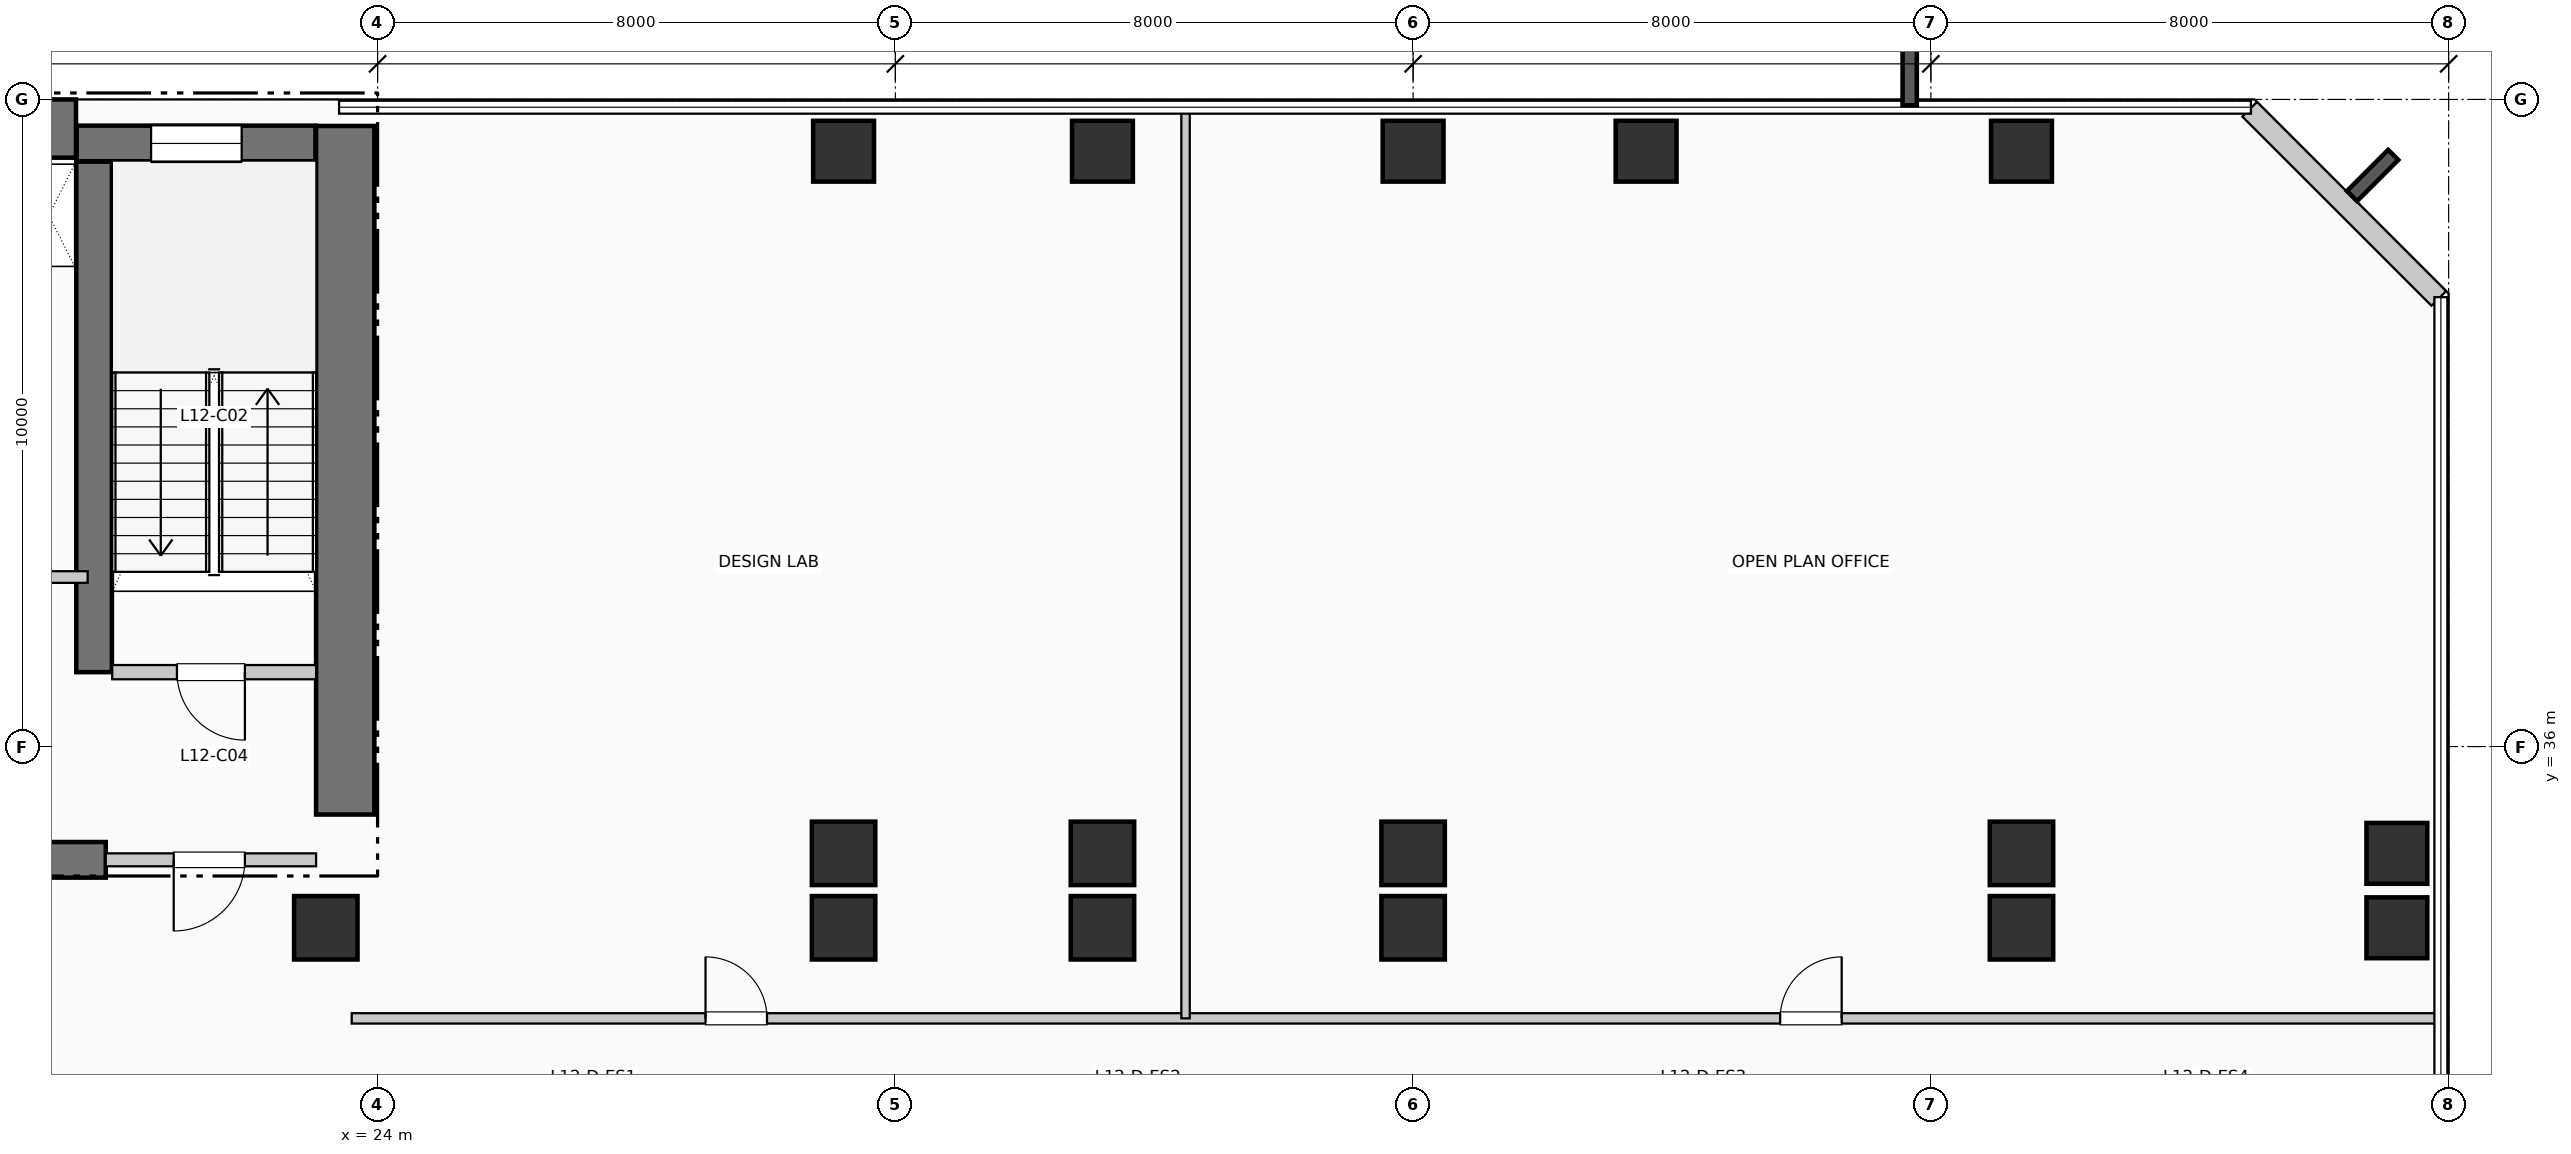
"""IFC4 building model, lengths in metres.
Left out: names, types, materials, properties, quantities, classifications, styles, units other than length and angle.
Written with IfcOpenShell. Run it as: python <this file> out.ifc"""

import sys

from ifc_helpers import new_model, si_unit, direction, frame, frame_2d, origin, origin_2d, place, context, subcontext, project, spatial, rectangle, extrude, element, fill, save


model = new_model("IFC4")
c1 = context("Model", 3, precision=1e-05, world=origin(), true_north=direction((0.0, 1.0)))
c2 = subcontext(c1, "Body", "Model", "MODEL_VIEW")
j1 = project(units=[si_unit("LENGTHUNIT", "METRE"), si_unit("PLANEANGLEUNIT", "RADIAN")], contexts=[c1])
p1 = place(None, origin())
s1 = spatial("IfcSite", under=j1, at=p1, CompositionType="ELEMENT")
p2 = place(p1, origin())
s2 = spatial("IfcBuilding", under=s1, at=p2, CompositionType="ELEMENT")
p3 = place(p2, frame((0.0, 0.0, 54.12)))
s3 = spatial("IfcBuildingStorey", under=s2, at=p3, CompositionType="ELEMENT", Elevation=54.12)
p4 = place(p3, frame((5.36, 45.55, 0.0), z_axis=(0.0, 0.0, 1.0), x_axis=(1.0, 0.0, 0.0)))
e1 = element("IfcWall", 1, at=p4, inside=s3, PredefinedType="SHEAR", context=c2, shape_type="SweptSolid", body=[
    extrude(rectangle(XDim=13.98, YDim=0.9, at=frame_2d((6.99, 0.0))), origin(), (0.0, 0.0, 1.0), 3.96),
])
p5 = place(p3, frame((23.5, 34.95, 0.0), z_axis=(0.0, 0.0, 1.0), x_axis=(0.0, 1.0, 0.0)))
e2 = element("IfcWall", 2, at=p5, inside=s3, PredefinedType="SHEAR", context=c2, shape_type="SweptSolid", body=[
    extrude(rectangle(XDim=10.64, YDim=0.9, at=frame_2d((5.32, 0.0))), origin(), (0.0, 0.0, 1.0), 3.96),
])
p6 = place(p3, frame((13.68, 34.25, 0.0), z_axis=(0.0, 0.0, 1.0), x_axis=(1.0, 0.0, 0.0)))
e3 = element("IfcWall", 3, at=p6, inside=s3, PredefinedType="SHEAR", context=c2, shape_type="SweptSolid", body=[
    extrude(rectangle(XDim=6.12, YDim=0.55, at=frame_2d((3.06, 0.0))), origin(), (0.0, 0.0, 1.0), 3.96),
])
p7 = place(p3, frame((19.62, 37.15, 0.0), z_axis=(0.0, 0.0, 1.0), x_axis=(0.0, 1.0, 0.0)))
e4 = element("IfcWall", 4, at=p7, inside=s3, PredefinedType="SHEAR", context=c2, shape_type="SweptSolid", body=[
    extrude(rectangle(XDim=7.89, YDim=0.55, at=frame_2d((3.945, 0.0))), origin(), (0.0, 0.0, 1.0), 3.96),
])
p8 = place(p3, frame((19.35, 45.32, 0.0), z_axis=(0.0, 0.0, 1.0), x_axis=(1.0, 0.0, 0.0)))
e5 = element("IfcWall", 5, at=p8, inside=s3, PredefinedType="SHEAR", context=c2, shape_type="SweptSolid", body=[
    extrude(rectangle(XDim=3.69, YDim=0.55, at=frame_2d((1.845, 0.0))), origin(), (0.0, 0.0, 1.0), 3.96),
])
p9 = place(p8, frame((1.15, 0.0, 1.05)))
e6 = element("IfcOpeningElement", 6, at=p9, cuts=e5, PredefinedType="OPENING", context=c2, shape_type="SweptSolid", body=[
    extrude(rectangle(XDim=1.4, YDim=1.8, at=frame_2d((0.7, 0.9))), frame((0.0, 0.285, 0.0), z_axis=(0.0, -1.0, 0.0), x_axis=(1.0, 0.0, 0.0)), (0.0, 0.0, 1.0), 0.57),
])
for number, where, z_axis, x_axis in (
    (7, (23.2, 33.2, 0.0), (0.0, 0.0, 1.0), (1.0, 0.0, 0.0)),
    (8, (31.2, 33.2, 0.0), (0.0, 0.0, 1.0), (1.0, 0.0, 0.0)),
    (9, (31.2, 34.35, 0.0), (0.0, 0.0, 1.0), (1.0, 0.0, 0.0)),
):
    element("IfcColumn", number, at=place(p3, frame(where, z_axis=z_axis, x_axis=x_axis)), inside=s3, PredefinedType="COLUMN", context=c2, shape_type="SweptSolid", body=[
        extrude(rectangle(XDim=0.98, YDim=0.98, at=origin_2d()), origin(), (0.0, 0.0, 1.0), 3.96),
    ])
p10 = place(p3, frame((31.2, 45.2, 0.0), z_axis=(0.0, 0.0, 1.0), x_axis=(1.0, 0.0, 0.0)))
e10 = element("IfcColumn", 10, at=p10, inside=s3, PredefinedType="COLUMN", context=c2, shape_type="SweptSolid", body=[
    extrude(rectangle(XDim=0.94, YDim=0.94, at=origin_2d()), origin(), (0.0, 0.0, 1.0), 3.96),
])
for number, where, z_axis, x_axis in (
    (11, (35.2, 33.2, 0.0), (0.0, 0.0, 1.0), (1.0, 0.0, 0.0)),
    (12, (35.2, 34.35, 0.0), (0.0, 0.0, 1.0), (1.0, 0.0, 0.0)),
):
    element("IfcColumn", number, at=place(p3, frame(where, z_axis=z_axis, x_axis=x_axis)), inside=s3, PredefinedType="COLUMN", context=c2, shape_type="SweptSolid", body=[
        extrude(rectangle(XDim=0.98, YDim=0.98, at=origin_2d()), origin(), (0.0, 0.0, 1.0), 3.96),
    ])
p11 = place(p3, frame((35.2, 45.2, 0.0), z_axis=(0.0, 0.0, 1.0), x_axis=(1.0, 0.0, 0.0)))
e13 = element("IfcColumn", 13, at=p11, inside=s3, PredefinedType="COLUMN", context=c2, shape_type="SweptSolid", body=[
    extrude(rectangle(XDim=0.94, YDim=0.94, at=origin_2d()), origin(), (0.0, 0.0, 1.0), 3.96),
])
for number, where, z_axis, x_axis in (
    (14, (40.0, 33.2, 0.0), (0.0, 0.0, 1.0), (1.0, 0.0, 0.0)),
    (15, (40.0, 34.35, 0.0), (0.0, 0.0, 1.0), (1.0, 0.0, 0.0)),
):
    element("IfcColumn", number, at=place(p3, frame(where, z_axis=z_axis, x_axis=x_axis)), inside=s3, PredefinedType="COLUMN", context=c2, shape_type="SweptSolid", body=[
        extrude(rectangle(XDim=0.98, YDim=0.98, at=origin_2d()), origin(), (0.0, 0.0, 1.0), 3.96),
    ])
for number, where, z_axis, x_axis in (
    (16, (40.0, 45.2, 0.0), (0.0, 0.0, 1.0), (1.0, 0.0, 0.0)),
    (17, (43.6, 45.2, 0.0), (0.0, 0.0, 1.0), (1.0, 0.0, 0.0)),
):
    element("IfcColumn", number, at=place(p3, frame(where, z_axis=z_axis, x_axis=x_axis)), inside=s3, PredefinedType="COLUMN", context=c2, shape_type="SweptSolid", body=[
        extrude(rectangle(XDim=0.94, YDim=0.94, at=origin_2d()), origin(), (0.0, 0.0, 1.0), 3.96),
    ])
for number, where, z_axis, x_axis in (
    (18, (49.4, 33.2, 0.0), (0.0, 0.0, 1.0), (1.0, 0.0, 0.0)),
    (19, (49.4, 34.35, 0.0), (0.0, 0.0, 1.0), (1.0, 0.0, 0.0)),
):
    element("IfcColumn", number, at=place(p3, frame(where, z_axis=z_axis, x_axis=x_axis)), inside=s3, PredefinedType="COLUMN", context=c2, shape_type="SweptSolid", body=[
        extrude(rectangle(XDim=0.98, YDim=0.98, at=origin_2d()), origin(), (0.0, 0.0, 1.0), 3.96),
    ])
for number, where, z_axis, x_axis in (
    (20, (49.4, 45.2, 0.0), (0.0, 0.0, 1.0), (1.0, 0.0, 0.0)),
    (21, (55.2, 33.2, 0.0), (0.0, 0.0, 1.0), (1.0, 0.0, 0.0)),
    (22, (55.2, 34.35, 0.0), (0.0, 0.0, 1.0), (1.0, 0.0, 0.0)),
):
    element("IfcColumn", number, at=place(p3, frame(where, z_axis=z_axis, x_axis=x_axis)), inside=s3, PredefinedType="COLUMN", context=c2, shape_type="SweptSolid", body=[
        extrude(rectangle(XDim=0.94, YDim=0.94, at=origin_2d()), origin(), (0.0, 0.0, 1.0), 3.96),
    ])
p12 = place(p3, frame((55.848, 42.926, 0.0), z_axis=(0.0, 0.0, 1.0), x_axis=(-0.707106781187, 0.707106781187, 0.0)))
e23 = element("IfcWall", 23, at=p12, inside=s3, PredefinedType="SOLIDWALL", context=c2, shape_type="SweptSolid", body=[
    extrude(rectangle(XDim=4.133, YDim=0.32, at=frame_2d((2.066, 0.0))), origin(), (0.0, 0.0, 1.0), 3.71),
])
p13 = place(p3, frame((19.9, 37.15, 0.0), z_axis=(0.0, 0.0, 1.0), x_axis=(1.0, 0.0, 0.0)))
e24 = element("IfcWall", 24, at=p13, inside=s3, PredefinedType="PARTITIONING", context=c2, shape_type="SweptSolid", body=[
    extrude(rectangle(XDim=3.15, YDim=0.22, at=frame_2d((1.575, 0.0))), origin(), (0.0, 0.0, 1.0), 3.71),
])
p14 = place(p13, frame((2.05, 0.0, 0.0), z_axis=(0.0, 0.0, 1.0), x_axis=(-1.0, 0.0, 0.0)))
e25 = element("IfcOpeningElement", 25, at=p14, cuts=e24, PredefinedType="OPENING", context=c2, shape_type="SweptSolid", body=[
    extrude(rectangle(XDim=1.05, YDim=2.15, at=frame_2d((0.525, 1.075))), frame((0.0, 0.12, 0.0), z_axis=(0.0, -1.0, 0.0), x_axis=(1.0, 0.0, 0.0)), (0.0, 0.0, 1.0), 0.24),
])
p15 = place(p3, frame((19.8, 34.25, 0.0), z_axis=(0.0, 0.0, 1.0), x_axis=(1.0, 0.0, 0.0)))
e26 = element("IfcWall", 26, at=p15, inside=s3, PredefinedType="PARTITIONING", context=c2, shape_type="SweptSolid", body=[
    extrude(rectangle(XDim=3.25, YDim=0.2, at=frame_2d((1.625, 0.0))), origin(), (0.0, 0.0, 1.0), 3.71),
])
p16 = place(p15, frame((2.15, 0.0, 0.0), z_axis=(0.0, 0.0, 1.0), x_axis=(-1.0, 0.0, 0.0)))
e27 = element("IfcOpeningElement", 27, at=p16, cuts=e26, PredefinedType="OPENING", context=c2, shape_type="SweptSolid", body=[
    extrude(rectangle(XDim=1.1, YDim=2.15, at=frame_2d((0.55, 1.075))), frame((0.0, 0.11, 0.0), z_axis=(0.0, -1.0, 0.0), x_axis=(1.0, 0.0, 0.0)), (0.0, 0.0, 1.0), 0.22),
])
p17 = place(p3, frame((17.68, 38.62, 0.0), z_axis=(0.0, 0.0, 1.0), x_axis=(1.0, 0.0, 0.0)))
e28 = element("IfcWall", 28, at=p17, inside=s3, PredefinedType="PARTITIONING", context=c2, shape_type="SweptSolid", body=[
    extrude(rectangle(XDim=1.84, YDim=0.18, at=frame_2d((0.92, 0.0))), origin(), (0.0, 0.0, 1.0), 3.71),
])
p18 = place(p17, frame((0.24, 0.0, 0.0)))
e29 = element("IfcOpeningElement", 29, at=p18, cuts=e28, PredefinedType="OPENING", context=c2, shape_type="SweptSolid", body=[
    extrude(rectangle(XDim=0.92, YDim=2.1, at=frame_2d((0.46, 1.05))), frame((0.0, 0.1, 0.0), z_axis=(0.0, -1.0, 0.0), x_axis=(1.0, 0.0, 0.0)), (0.0, 0.0, 1.0), 0.2),
])
p19 = place(p3, frame((23.6, 31.8, 0.0), z_axis=(0.0, 0.0, 1.0), x_axis=(1.0, 0.0, 0.0)))
e30 = element("IfcWall", 30, at=p19, inside=s3, PredefinedType="PARTITIONING", context=c2, shape_type="SweptSolid", body=[
    extrude(rectangle(XDim=32.21, YDim=0.16, at=frame_2d((16.105, 0.0))), origin(), (0.0, 0.0, 1.0), 3.71),
])
p20 = place(p19, frame((5.467, 0.0, 0.0)))
e31 = element("IfcOpeningElement", 31, at=p20, cuts=e30, PredefinedType="OPENING", context=c2, shape_type="SweptSolid", body=[
    extrude(rectangle(XDim=0.95, YDim=2.15, at=frame_2d((0.475, 1.075))), frame((0.0, 0.09, 0.0), z_axis=(0.0, -1.0, 0.0), x_axis=(1.0, 0.0, 0.0)), (0.0, 0.0, 1.0), 0.18),
])
p21 = place(p19, frame((22.072, 0.0, 0.0)))
e32 = element("IfcOpeningElement", 32, at=p21, cuts=e30, PredefinedType="OPENING", context=c2, shape_type="SweptSolid", body=[
    extrude(rectangle(XDim=0.95, YDim=2.15, at=frame_2d((0.475, 1.075))), frame((0.0, 0.09, 0.0), z_axis=(0.0, -1.0, 0.0), x_axis=(1.0, 0.0, 0.0)), (0.0, 0.0, 1.0), 0.18),
])
p22 = place(p3, frame((36.484, 31.8, 0.0), z_axis=(0.0, 0.0, 1.0), x_axis=(0.0, 1.0, 0.0)))
e33 = element("IfcWall", 33, at=p22, inside=s3, PredefinedType="PARTITIONING", context=c2, shape_type="SweptSolid", body=[
    extrude(rectangle(XDim=14.01, YDim=0.13, at=frame_2d((7.005, 0.0))), origin(), (0.0, 0.0, 1.0), 3.71),
])
p23 = place(p9, origin())
e34 = element("IfcWindow", 34, at=p23, inside=s3, PartitioningType="SINGLE_PANEL", PredefinedType="WINDOW", context=c2, shape_type="SweptSolid", body=[
    extrude(rectangle(XDim=1.4, YDim=1.8, at=frame_2d((0.7, 0.9))), frame((0.0, 0.03, 0.0), z_axis=(0.0, -1.0, 0.0), x_axis=(1.0, 0.0, 0.0)), (0.0, 0.0, 1.0), 0.06),
])
fill(e6, e34)
p24 = place(p14, origin())
e35 = element("IfcDoor", 35, at=p24, inside=s3, OperationType="SINGLE_SWING_RIGHT", PredefinedType="DOOR", context=c2, shape_type="SweptSolid", body=[
    extrude(rectangle(XDim=1.05, YDim=2.15, at=frame_2d((0.525, 1.075))), frame((0.0, 0.025, 0.0), z_axis=(0.0, -1.0, 0.0), x_axis=(1.0, 0.0, 0.0)), (0.0, 0.0, 1.0), 0.05),
])
fill(e25, e35)
p25 = place(p16, origin())
e36 = element("IfcDoor", 36, at=p25, inside=s3, OperationType="SINGLE_SWING_LEFT", PredefinedType="DOOR", context=c2, shape_type="SweptSolid", body=[
    extrude(rectangle(XDim=1.1, YDim=2.15, at=frame_2d((0.55, 1.075))), frame((0.0, 0.025, 0.0), z_axis=(0.0, -1.0, 0.0), x_axis=(1.0, 0.0, 0.0)), (0.0, 0.0, 1.0), 0.05),
])
fill(e27, e36)
p26 = place(p20, origin())
e37 = element("IfcDoor", 37, at=p26, inside=s3, OperationType="SINGLE_SWING_LEFT", PredefinedType="DOOR", context=c2, shape_type="SweptSolid", body=[
    extrude(rectangle(XDim=0.95, YDim=2.15, at=frame_2d((0.475, 1.075))), frame((0.0, 0.025, 0.0), z_axis=(0.0, -1.0, 0.0), x_axis=(1.0, 0.0, 0.0)), (0.0, 0.0, 1.0), 0.05),
])
fill(e31, e37)
p27 = place(p21, origin())
e38 = element("IfcDoor", 38, at=p27, inside=s3, OperationType="SINGLE_SWING_RIGHT", PredefinedType="DOOR", context=c2, shape_type="SweptSolid", body=[
    extrude(rectangle(XDim=0.95, YDim=2.15, at=frame_2d((0.475, 1.075))), frame((0.0, 0.025, 0.0), z_axis=(0.0, -1.0, 0.0), x_axis=(1.0, 0.0, 0.0)), (0.0, 0.0, 1.0), 0.05),
])
fill(e32, e38)
save(model, sys.argv[1])
